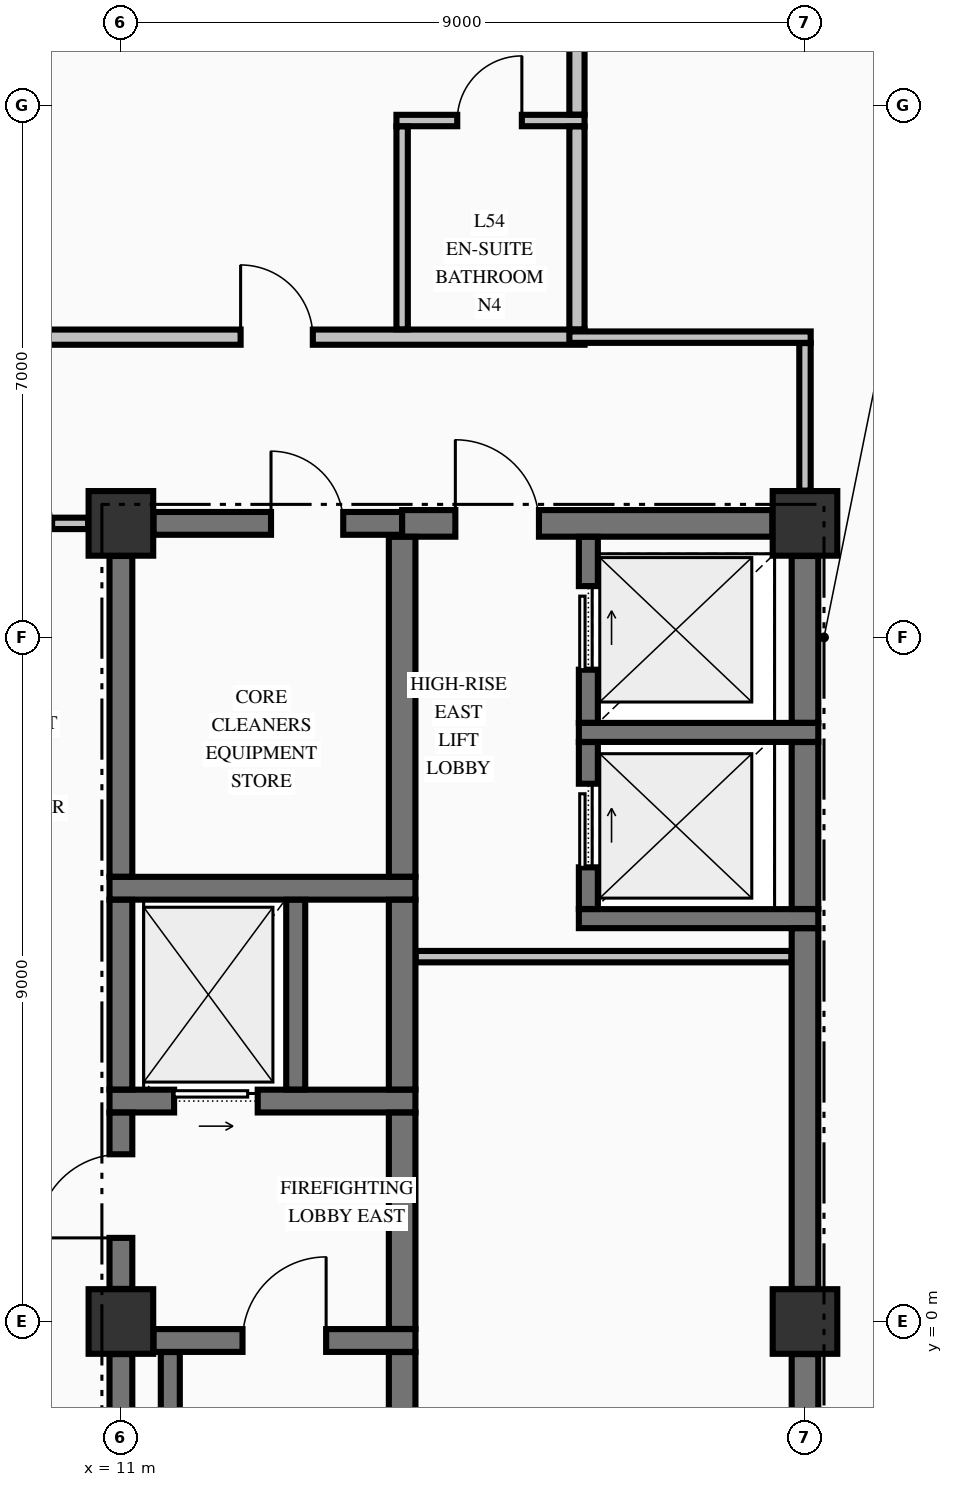
"""IFC4 building model, lengths in metres.
Left out: names, types, materials, properties, quantities, classifications, styles, units other than length and angle.
Written with IfcOpenShell. Run it as: python <this file> out.ifc"""

import sys

from ifc_helpers import new_model, si_unit, direction, frame, frame_2d, origin, origin_2d, place, context, subcontext, project, spatial, rectangle, extrude, element, fill, save


model = new_model("IFC4")
c1 = context("Model", 3, precision=1e-05, world=origin(), true_north=direction((0.0, 1.0)))
c2 = subcontext(c1, "Body", "Model", "MODEL_VIEW")
j1 = project(units=[si_unit("LENGTHUNIT", "METRE"), si_unit("PLANEANGLEUNIT", "RADIAN")], contexts=[c1])
p1 = place(None, origin())
s1 = spatial("IfcSite", under=j1, at=p1, CompositionType="ELEMENT")
p2 = place(p1, origin())
s2 = spatial("IfcBuilding", under=s1, at=p2, CompositionType="ELEMENT")
p3 = place(p2, frame((0.0, 0.0, 208.46)))
s3 = spatial("IfcBuildingStorey", under=s2, at=p3, CompositionType="ELEMENT", Elevation=208.46)
for number, where, z_axis, x_axis in (
    (1, (11.0, 0.0, -0.25), (0.0, 0.0, 1.0), (1.0, 0.0, 0.0)),
    (2, (11.0, 10.5, -0.25), (0.0, 0.0, 1.0), (1.0, 0.0, 0.0)),
    (3, (20.0, 10.5, -0.25), (0.0, 0.0, 1.0), (1.0, 0.0, 0.0)),
    (4, (20.0, 0.0, -0.25), (0.0, 0.0, 1.0), (1.0, 0.0, 0.0)),
):
    element("IfcColumn", number, at=place(p3, frame(where, z_axis=z_axis, x_axis=x_axis)), inside=s3, PredefinedType="COLUMN", context=c2, shape_type="SweptSolid", body=[
        extrude(rectangle(XDim=0.85, YDim=0.85, at=origin_2d()), origin(), (0.0, 0.0, 1.0), 3.325),
    ])
p4 = place(p3, frame((11.429, -0.25, 0.0), z_axis=(0.0, 0.0, 1.0), x_axis=(1.0, 0.0, 0.0)))
e5 = element("IfcWall", 5, at=p4, inside=s3, PredefinedType="SHEAR", context=c2, shape_type="SweptSolid", body=[
    extrude(rectangle(XDim=3.446, YDim=0.3, at=frame_2d((1.723, 0.0))), origin(), (0.0, 0.0, 1.0), 3.075),
])
p5 = place(p4, frame((1.171, 0.0, 0.0)))
e6 = element("IfcOpeningElement", 6, at=p5, cuts=e5, PredefinedType="OPENING", context=c2, shape_type="SweptSolid", body=[
    extrude(rectangle(XDim=1.1, YDim=2.15, at=frame_2d((0.55, 1.075))), frame((0.0, 0.16, 0.0), z_axis=(0.0, -1.0, 0.0), x_axis=(1.0, 0.0, 0.0)), (0.0, 0.0, 1.0), 0.32),
])
p6 = place(p3, frame((10.85, 2.9, 0.0), z_axis=(0.0, 0.0, 1.0), x_axis=(1.0, 0.0, 0.0)))
e7 = element("IfcWall", 7, at=p6, inside=s3, PredefinedType="SHEAR", context=c2, shape_type="SweptSolid", body=[
    extrude(rectangle(XDim=4.025, YDim=0.3, at=frame_2d((2.012, 0.0))), origin(), (0.0, 0.0, 1.0), 3.075),
])
p7 = place(p6, frame((0.85, 0.0, 0.0)))
e8 = element("IfcOpeningElement", 8, at=p7, cuts=e7, PredefinedType="OPENING", context=c2, shape_type="SweptSolid", body=[
    extrude(rectangle(XDim=1.1, YDim=2.2, at=frame_2d((0.55, 1.1))), frame((0.0, 0.16, 0.0), z_axis=(0.0, -1.0, 0.0), x_axis=(1.0, 0.0, 0.0)), (0.0, 0.0, 1.0), 0.32),
])
p8 = place(p3, frame((17.025, 5.3, 0.0), z_axis=(0.0, 0.0, 1.0), x_axis=(1.0, 0.0, 0.0)))
e9 = element("IfcWall", 9, at=p8, inside=s3, PredefinedType="SOLIDWALL", context=c2, shape_type="SweptSolid", body=[
    extrude(rectangle(XDim=3.15, YDim=0.25, at=frame_2d((1.575, 0.0))), origin(), (0.0, 0.0, 1.0), 3.075),
])
p9 = place(p3, frame((10.85, 5.7, 0.0), z_axis=(0.0, 0.0, 1.0), x_axis=(1.0, 0.0, 0.0)))
e10 = element("IfcWall", 10, at=p9, inside=s3, PredefinedType="SHEAR", context=c2, shape_type="SweptSolid", body=[
    extrude(rectangle(XDim=4.025, YDim=0.3, at=frame_2d((2.012, 0.0))), origin(), (0.0, 0.0, 1.0), 3.075),
])
p10 = place(p3, frame((17.025, 7.75, 0.0), z_axis=(0.0, 0.0, 1.0), x_axis=(1.0, 0.0, 0.0)))
e11 = element("IfcWall", 11, at=p10, inside=s3, PredefinedType="SOLIDWALL", context=c2, shape_type="SweptSolid", body=[
    extrude(rectangle(XDim=3.15, YDim=0.25, at=frame_2d((1.575, 0.0))), origin(), (0.0, 0.0, 1.0), 3.075),
])
p11 = place(p3, frame((11.429, 10.5, 0.0), z_axis=(0.0, 0.0, 1.0), x_axis=(1.0, 0.0, 0.0)))
e12 = element("IfcWall", 12, at=p11, inside=s3, PredefinedType="SHEAR", context=c2, shape_type="SweptSolid", body=[
    extrude(rectangle(XDim=3.271, YDim=0.3, at=frame_2d((1.635, 0.0))), origin(), (0.0, 0.0, 1.0), 3.075),
])
p12 = place(p11, frame((1.546, 0.0, 0.0)))
e13 = element("IfcOpeningElement", 13, at=p12, cuts=e12, PredefinedType="OPENING", context=c2, shape_type="SweptSolid", body=[
    extrude(rectangle(XDim=0.95, YDim=2.15, at=frame_2d((0.475, 1.075))), frame((0.0, 0.16, 0.0), z_axis=(0.0, -1.0, 0.0), x_axis=(1.0, 0.0, 0.0)), (0.0, 0.0, 1.0), 0.32),
])
p13 = place(p3, frame((14.7, 10.5, 0.0), z_axis=(0.0, 0.0, 1.0), x_axis=(1.0, 0.0, 0.0)))
e14 = element("IfcWall", 14, at=p13, inside=s3, PredefinedType="SHEAR", context=c2, shape_type="SweptSolid", body=[
    extrude(rectangle(XDim=4.871, YDim=0.35, at=frame_2d((2.436, 0.0))), origin(), (0.0, 0.0, 1.0), 3.075),
])
p14 = place(p13, frame((0.7, 0.0, 0.0)))
e15 = element("IfcOpeningElement", 15, at=p14, cuts=e14, PredefinedType="OPENING", context=c2, shape_type="SweptSolid", body=[
    extrude(rectangle(XDim=1.1, YDim=2.15, at=frame_2d((0.55, 1.075))), frame((0.0, 0.185, 0.0), z_axis=(0.0, -1.0, 0.0), x_axis=(1.0, 0.0, 0.0)), (0.0, 0.0, 1.0), 0.37),
])
p15 = place(p3, frame((14.878, 4.8, 0.0), z_axis=(0.0, 0.0, 1.0), x_axis=(1.0, 0.0, 0.0)))
e16 = element("IfcWall", 16, at=p15, inside=s3, PredefinedType="PARTITIONING", context=c2, shape_type="SweptSolid", body=[
    extrude(rectangle(XDim=4.944, YDim=0.15, at=frame_2d((2.472, 0.0))), origin(), (0.0, 0.0, 1.0), 3.075),
])
p16 = place(p3, frame((-10.569, 10.5, 0.0), z_axis=(0.0, 0.0, 1.0), x_axis=(1.0, 0.0, 0.0)))
e17 = element("IfcWall", 17, at=p16, inside=s3, PredefinedType="PARTITIONING", context=c2, shape_type="SweptSolid", body=[
    extrude(rectangle(XDim=21.138, YDim=0.15, at=frame_2d((10.569, 0.0))), origin(), (0.0, 0.0, 1.0), 3.075),
])
p17 = place(p16, frame((0.474, 0.0, 0.0)))
e18 = element("IfcOpeningElement", 18, at=p17, cuts=e17, PredefinedType="OPENING", context=c2, shape_type="SweptSolid", body=[
    extrude(rectangle(XDim=1.05, YDim=2.15, at=frame_2d((0.525, 1.075))), frame((0.0, 0.085, 0.0), z_axis=(0.0, -1.0, 0.0), x_axis=(1.0, 0.0, 0.0)), (0.0, 0.0, 1.0), 0.17),
])
p18 = place(p16, frame((19.614, 0.0, 0.0)))
e19 = element("IfcOpeningElement", 19, at=p18, cuts=e17, PredefinedType="OPENING", context=c2, shape_type="SweptSolid", body=[
    extrude(rectangle(XDim=1.05, YDim=2.15, at=frame_2d((0.525, 1.075))), frame((0.0, 0.085, 0.0), z_axis=(0.0, -1.0, 0.0), x_axis=(1.0, 0.0, 0.0)), (0.0, 0.0, 1.0), 0.17),
])
p19 = place(p3, frame((-22.1, 12.95, 0.0), z_axis=(0.0, 0.0, 1.0), x_axis=(1.0, 0.0, 0.0)))
e20 = element("IfcWall", 20, at=p19, inside=s3, PredefinedType="PARTITIONING", context=c2, shape_type="SweptSolid", body=[
    extrude(rectangle(XDim=39.2, YDim=0.2, at=frame_2d((19.6, 0.0))), origin(), (0.0, 0.0, 1.0), 3.075),
])
p20 = place(p19, frame((4.525, 0.0, 0.0)))
e21 = element("IfcOpeningElement", 21, at=p20, cuts=e20, PredefinedType="OPENING", context=c2, shape_type="SweptSolid", body=[
    extrude(rectangle(XDim=0.95, YDim=2.15, at=frame_2d((0.475, 1.075))), frame((0.0, 0.11, 0.0), z_axis=(0.0, -1.0, 0.0), x_axis=(1.0, 0.0, 0.0)), (0.0, 0.0, 1.0), 0.22),
])
p21 = place(p19, frame((12.475, 0.0, 0.0)))
e22 = element("IfcOpeningElement", 22, at=p21, cuts=e20, PredefinedType="OPENING", context=c2, shape_type="SweptSolid", body=[
    extrude(rectangle(XDim=0.95, YDim=2.15, at=frame_2d((0.475, 1.075))), frame((0.0, 0.11, 0.0), z_axis=(0.0, -1.0, 0.0), x_axis=(1.0, 0.0, 0.0)), (0.0, 0.0, 1.0), 0.22),
])
p22 = place(p19, frame((22.175, 0.0, 0.0)))
e23 = element("IfcOpeningElement", 23, at=p22, cuts=e20, PredefinedType="OPENING", context=c2, shape_type="SweptSolid", body=[
    extrude(rectangle(XDim=0.95, YDim=2.15, at=frame_2d((0.475, 1.075))), frame((0.0, 0.11, 0.0), z_axis=(0.0, -1.0, 0.0), x_axis=(1.0, 0.0, 0.0)), (0.0, 0.0, 1.0), 0.22),
])
p23 = place(p19, frame((34.675, 0.0, 0.0)))
e24 = element("IfcOpeningElement", 24, at=p23, cuts=e20, PredefinedType="OPENING", context=c2, shape_type="SweptSolid", body=[
    extrude(rectangle(XDim=0.95, YDim=2.15, at=frame_2d((0.475, 1.075))), frame((0.0, 0.11, 0.0), z_axis=(0.0, -1.0, 0.0), x_axis=(1.0, 0.0, 0.0)), (0.0, 0.0, 1.0), 0.22),
])
p24 = place(p3, frame((16.9, 12.95, 0.0), z_axis=(0.0, 0.0, 1.0), x_axis=(1.0, 0.0, 0.0)))
e25 = element("IfcWall", 25, at=p24, inside=s3, PredefinedType="PARTITIONING", context=c2, shape_type="SweptSolid", body=[
    extrude(rectangle(XDim=3.175, YDim=0.15, at=frame_2d((1.587, 0.0))), origin(), (0.0, 0.0, 1.0), 3.075),
])
p25 = place(p3, frame((14.625, 15.8, 0.0), z_axis=(0.0, 0.0, 1.0), x_axis=(1.0, 0.0, 0.0)))
e26 = element("IfcWall", 26, at=p25, inside=s3, PredefinedType="PARTITIONING", context=c2, shape_type="SweptSolid", body=[
    extrude(rectangle(XDim=2.475, YDim=0.15, at=frame_2d((1.238, 0.0))), origin(), (0.0, 0.0, 1.0), 3.075),
])
p26 = place(p25, frame((0.8, 0.0, 0.0)))
e27 = element("IfcOpeningElement", 27, at=p26, cuts=e26, PredefinedType="OPENING", context=c2, shape_type="SweptSolid", body=[
    extrude(rectangle(XDim=0.85, YDim=2.1, at=frame_2d((0.425, 1.05))), frame((0.0, 0.085, 0.0), z_axis=(0.0, -1.0, 0.0), x_axis=(1.0, 0.0, 0.0)), (0.0, 0.0, 1.0), 0.17),
])
p27 = place(p3, frame((11.0, -9.521, 0.0), z_axis=(0.0, 0.0, 1.0), x_axis=(0.0, 1.0, 0.0)))
e28 = element("IfcWall", 28, at=p27, inside=s3, PredefinedType="SHEAR", context=c2, shape_type="SweptSolid", body=[
    extrude(rectangle(XDim=9.092, YDim=0.3, at=frame_2d((4.546, 0.0))), origin(), (0.0, 0.0, 1.0), 3.075),
])
p28 = place(p3, frame((11.0, 0.429, 0.0), z_axis=(0.0, 0.0, 1.0), x_axis=(0.0, 1.0, 0.0)))
e29 = element("IfcWall", 29, at=p28, inside=s3, PredefinedType="SHEAR", context=c2, shape_type="SweptSolid", body=[
    extrude(rectangle(XDim=2.319, YDim=0.3, at=frame_2d((1.16, 0.0))), origin(), (0.0, 0.0, 1.0), 3.075),
])
p29 = place(p28, frame((0.671, 0.0, 0.0)))
e30 = element("IfcOpeningElement", 30, at=p29, cuts=e29, PredefinedType="OPENING", context=c2, shape_type="SweptSolid", body=[
    extrude(rectangle(XDim=1.1, YDim=2.15, at=frame_2d((0.55, 1.075))), frame((0.0, 0.16, 0.0), z_axis=(0.0, -1.0, 0.0), x_axis=(1.0, 0.0, 0.0)), (0.0, 0.0, 1.0), 0.32),
])
p30 = place(p3, frame((11.0, 3.052, 0.0), z_axis=(0.0, 0.0, 1.0), x_axis=(0.0, 1.0, 0.0)))
e31 = element("IfcWall", 31, at=p30, inside=s3, PredefinedType="SHEAR", context=c2, shape_type="SweptSolid", body=[
    extrude(rectangle(XDim=2.496, YDim=0.3, at=frame_2d((1.248, 0.0))), origin(), (0.0, 0.0, 1.0), 3.075),
])
p31 = place(p3, frame((11.0, 5.852, 0.0), z_axis=(0.0, 0.0, 1.0), x_axis=(0.0, 1.0, 0.0)))
e32 = element("IfcWall", 32, at=p31, inside=s3, PredefinedType="SHEAR", context=c2, shape_type="SweptSolid", body=[
    extrude(rectangle(XDim=4.219, YDim=0.3, at=frame_2d((2.109, 0.0))), origin(), (0.0, 0.0, 1.0), 3.075),
])
p32 = place(p3, frame((11.65, -9.798, 0.0), z_axis=(0.0, 0.0, 1.0), x_axis=(0.0, 1.0, 0.0)))
e33 = element("IfcWall", 33, at=p32, inside=s3, PredefinedType="SOLIDWALL", context=c2, shape_type="SweptSolid", body=[
    extrude(rectangle(XDim=9.396, YDim=0.25, at=frame_2d((4.698, 0.0))), origin(), (0.0, 0.0, 1.0), 3.075),
])
p33 = place(p3, frame((13.3, 3.052, 0.0), z_axis=(0.0, 0.0, 1.0), x_axis=(0.0, 1.0, 0.0)))
e34 = element("IfcWall", 34, at=p33, inside=s3, PredefinedType="SOLIDWALL", context=c2, shape_type="SweptSolid", body=[
    extrude(rectangle(XDim=2.496, YDim=0.25, at=frame_2d((1.248, 0.0))), origin(), (0.0, 0.0, 1.0), 3.075),
])
p34 = place(p3, frame((14.7, -9.773, 0.0), z_axis=(0.0, 0.0, 1.0), x_axis=(0.0, 1.0, 0.0)))
e35 = element("IfcWall", 35, at=p34, inside=s3, PredefinedType="SHEAR", context=c2, shape_type="SweptSolid", body=[
    extrude(rectangle(XDim=9.371, YDim=0.35, at=frame_2d((4.686, 0.0))), origin(), (0.0, 0.0, 1.0), 3.075),
])
p35 = place(p3, frame((14.7, -0.098, 0.0), z_axis=(0.0, 0.0, 1.0), x_axis=(0.0, 1.0, 0.0)))
e36 = element("IfcWall", 36, at=p35, inside=s3, PredefinedType="SHEAR", context=c2, shape_type="SweptSolid", body=[
    extrude(rectangle(XDim=2.846, YDim=0.35, at=frame_2d((1.423, 0.0))), origin(), (0.0, 0.0, 1.0), 3.075),
])
p36 = place(p3, frame((14.7, 3.052, 0.0), z_axis=(0.0, 0.0, 1.0), x_axis=(0.0, 1.0, 0.0)))
e37 = element("IfcWall", 37, at=p36, inside=s3, PredefinedType="SHEAR", context=c2, shape_type="SweptSolid", body=[
    extrude(rectangle(XDim=2.496, YDim=0.35, at=frame_2d((1.248, 0.0))), origin(), (0.0, 0.0, 1.0), 3.075),
])
p37 = place(p3, frame((14.7, 5.852, 0.0), z_axis=(0.0, 0.0, 1.0), x_axis=(0.0, 1.0, 0.0)))
e38 = element("IfcWall", 38, at=p37, inside=s3, PredefinedType="SHEAR", context=c2, shape_type="SweptSolid", body=[
    extrude(rectangle(XDim=4.471, YDim=0.35, at=frame_2d((2.235, 0.0))), origin(), (0.0, 0.0, 1.0), 3.075),
])
p38 = place(p3, frame((17.15, 5.427, 0.0), z_axis=(0.0, 0.0, 1.0), x_axis=(0.0, 1.0, 0.0)))
e39 = element("IfcWall", 39, at=p38, inside=s3, PredefinedType="SOLIDWALL", context=c2, shape_type="SweptSolid", body=[
    extrude(rectangle(XDim=2.196, YDim=0.25, at=frame_2d((1.098, 0.0))), origin(), (0.0, 0.0, 1.0), 3.075),
])
p39 = place(p38, frame((0.548, 0.0, 0.0)))
e40 = element("IfcOpeningElement", 40, at=p39, cuts=e39, PredefinedType="OPENING", context=c2, shape_type="SweptSolid", body=[
    extrude(rectangle(XDim=1.1, YDim=2.2, at=frame_2d((0.55, 1.1))), frame((0.0, 0.135, 0.0), z_axis=(0.0, -1.0, 0.0), x_axis=(1.0, 0.0, 0.0)), (0.0, 0.0, 1.0), 0.27),
])
p40 = place(p3, frame((17.15, 7.877, 0.0), z_axis=(0.0, 0.0, 1.0), x_axis=(0.0, 1.0, 0.0)))
e41 = element("IfcWall", 41, at=p40, inside=s3, PredefinedType="SOLIDWALL", context=c2, shape_type="SweptSolid", body=[
    extrude(rectangle(XDim=2.446, YDim=0.25, at=frame_2d((1.223, 0.0))), origin(), (0.0, 0.0, 1.0), 3.075),
])
p41 = place(p40, frame((0.698, 0.0, 0.0)))
e42 = element("IfcOpeningElement", 42, at=p41, cuts=e41, PredefinedType="OPENING", context=c2, shape_type="SweptSolid", body=[
    extrude(rectangle(XDim=1.1, YDim=2.2, at=frame_2d((0.55, 1.1))), frame((0.0, 0.135, 0.0), z_axis=(0.0, -1.0, 0.0), x_axis=(1.0, 0.0, 0.0)), (0.0, 0.0, 1.0), 0.27),
])
p42 = place(p3, frame((20.0, -9.521, 0.0), z_axis=(0.0, 0.0, 1.0), x_axis=(0.0, 1.0, 0.0)))
e43 = element("IfcWall", 43, at=p42, inside=s3, PredefinedType="SHEAR", context=c2, shape_type="SweptSolid", body=[
    extrude(rectangle(XDim=9.092, YDim=0.35, at=frame_2d((4.546, 0.0))), origin(), (0.0, 0.0, 1.0), 3.075),
])
p43 = place(p3, frame((20.0, 0.429, 0.0), z_axis=(0.0, 0.0, 1.0), x_axis=(0.0, 1.0, 0.0)))
e44 = element("IfcWall", 44, at=p43, inside=s3, PredefinedType="SHEAR", context=c2, shape_type="SweptSolid", body=[
    extrude(rectangle(XDim=4.744, YDim=0.35, at=frame_2d((2.372, 0.0))), origin(), (0.0, 0.0, 1.0), 3.075),
])
p44 = place(p3, frame((20.0, 5.427, 0.0), z_axis=(0.0, 0.0, 1.0), x_axis=(0.0, 1.0, 0.0)))
e45 = element("IfcWall", 45, at=p44, inside=s3, PredefinedType="SHEAR", context=c2, shape_type="SweptSolid", body=[
    extrude(rectangle(XDim=2.196, YDim=0.35, at=frame_2d((1.098, 0.0))), origin(), (0.0, 0.0, 1.0), 3.075),
])
p45 = place(p3, frame((20.0, 7.877, 0.0), z_axis=(0.0, 0.0, 1.0), x_axis=(0.0, 1.0, 0.0)))
e46 = element("IfcWall", 46, at=p45, inside=s3, PredefinedType="SHEAR", context=c2, shape_type="SweptSolid", body=[
    extrude(rectangle(XDim=2.194, YDim=0.35, at=frame_2d((1.097, 0.0))), origin(), (0.0, 0.0, 1.0), 3.075),
])
p46 = place(p3, frame((14.7, 13.053, 0.0), z_axis=(0.0, 0.0, 1.0), x_axis=(0.0, 1.0, 0.0)))
e47 = element("IfcWall", 47, at=p46, inside=s3, PredefinedType="PARTITIONING", context=c2, shape_type="SweptSolid", body=[
    extrude(rectangle(XDim=2.669, YDim=0.15, at=frame_2d((1.334, 0.0))), origin(), (0.0, 0.0, 1.0), 3.075),
])
p47 = place(p3, frame((17.0, 13.053, 0.0), z_axis=(0.0, 0.0, 1.0), x_axis=(0.0, 1.0, 0.0)))
e48 = element("IfcWall", 48, at=p47, inside=s3, PredefinedType="PARTITIONING", context=c2, shape_type="SweptSolid", body=[
    extrude(rectangle(XDim=2.669, YDim=0.2, at=frame_2d((1.334, 0.0))), origin(), (0.0, 0.0, 1.0), 3.075),
])
p48 = place(p3, frame((17.0, 15.878, 0.0), z_axis=(0.0, 0.0, 1.0), x_axis=(0.0, 1.0, 0.0)))
e49 = element("IfcWall", 49, at=p48, inside=s3, PredefinedType="PARTITIONING", context=c2, shape_type="SweptSolid", body=[
    extrude(rectangle(XDim=3.116, YDim=0.2, at=frame_2d((1.558, 0.0))), origin(), (0.0, 0.0, 1.0), 3.075),
])
p49 = place(p3, frame((20.0, 10.931, 0.0), z_axis=(0.0, 0.0, 1.0), x_axis=(0.0, 1.0, 0.0)))
e50 = element("IfcWall", 50, at=p49, inside=s3, PredefinedType="PARTITIONING", context=c2, shape_type="SweptSolid", body=[
    extrude(rectangle(XDim=1.941, YDim=0.15, at=frame_2d((0.971, 0.0))), origin(), (0.0, 0.0, 1.0), 2.267),
])
p50 = place(p5, origin())
e51 = element("IfcDoor", 51, at=p50, inside=s3, OperationType="SINGLE_SWING_RIGHT", PredefinedType="DOOR", context=c2, shape_type="SweptSolid", body=[
    extrude(rectangle(XDim=1.1, YDim=2.15, at=frame_2d((0.55, 1.075))), frame((0.0, 0.025, 0.0), z_axis=(0.0, -1.0, 0.0), x_axis=(1.0, 0.0, 0.0)), (0.0, 0.0, 1.0), 0.05),
])
fill(e6, e51)
p51 = place(p29, origin())
e52 = element("IfcDoor", 52, at=p51, inside=s3, OperationType="SINGLE_SWING_LEFT", PredefinedType="DOOR", context=c2, shape_type="SweptSolid", body=[
    extrude(rectangle(XDim=1.1, YDim=2.15, at=frame_2d((0.55, 1.075))), frame((0.0, 0.025, 0.0), z_axis=(0.0, -1.0, 0.0), x_axis=(1.0, 0.0, 0.0)), (0.0, 0.0, 1.0), 0.05),
])
fill(e30, e52)
p52 = place(p7, origin())
e53 = element("IfcDoor", 53, at=p52, inside=s3, OperationType="SLIDING_TO_RIGHT", PredefinedType="DOOR", context=c2, shape_type="SweptSolid", body=[
    extrude(rectangle(XDim=1.1, YDim=2.2, at=frame_2d((0.55, 1.1))), frame((0.0, 0.025, 0.0), z_axis=(0.0, -1.0, 0.0), x_axis=(1.0, 0.0, 0.0)), (0.0, 0.0, 1.0), 0.05),
])
fill(e8, e53)
p53 = place(p12, origin())
e54 = element("IfcDoor", 54, at=p53, inside=s3, OperationType="SINGLE_SWING_LEFT", PredefinedType="DOOR", context=c2, shape_type="SweptSolid", body=[
    extrude(rectangle(XDim=0.95, YDim=2.15, at=frame_2d((0.475, 1.075))), frame((0.0, 0.025, 0.0), z_axis=(0.0, -1.0, 0.0), x_axis=(1.0, 0.0, 0.0)), (0.0, 0.0, 1.0), 0.05),
])
fill(e13, e54)
p54 = place(p39, origin())
e55 = element("IfcDoor", 55, at=p54, inside=s3, OperationType="SLIDING_TO_RIGHT", PredefinedType="DOOR", context=c2, shape_type="SweptSolid", body=[
    extrude(rectangle(XDim=1.1, YDim=2.2, at=frame_2d((0.55, 1.1))), frame((0.0, 0.025, 0.0), z_axis=(0.0, -1.0, 0.0), x_axis=(1.0, 0.0, 0.0)), (0.0, 0.0, 1.0), 0.05),
])
fill(e40, e55)
p55 = place(p41, origin())
e56 = element("IfcDoor", 56, at=p55, inside=s3, OperationType="SLIDING_TO_RIGHT", PredefinedType="DOOR", context=c2, shape_type="SweptSolid", body=[
    extrude(rectangle(XDim=1.1, YDim=2.2, at=frame_2d((0.55, 1.1))), frame((0.0, 0.025, 0.0), z_axis=(0.0, -1.0, 0.0), x_axis=(1.0, 0.0, 0.0)), (0.0, 0.0, 1.0), 0.05),
])
fill(e42, e56)
p56 = place(p14, origin())
e57 = element("IfcDoor", 57, at=p56, inside=s3, OperationType="SINGLE_SWING_LEFT", PredefinedType="DOOR", context=c2, shape_type="SweptSolid", body=[
    extrude(rectangle(XDim=1.1, YDim=2.15, at=frame_2d((0.55, 1.075))), frame((0.0, 0.025, 0.0), z_axis=(0.0, -1.0, 0.0), x_axis=(1.0, 0.0, 0.0)), (0.0, 0.0, 1.0), 0.05),
])
fill(e15, e57)
p57 = place(p23, origin())
e58 = element("IfcDoor", 58, at=p57, inside=s3, OperationType="SINGLE_SWING_LEFT", PredefinedType="DOOR", context=c2, shape_type="SweptSolid", body=[
    extrude(rectangle(XDim=0.95, YDim=2.15, at=frame_2d((0.475, 1.075))), frame((0.0, 0.025, 0.0), z_axis=(0.0, -1.0, 0.0), x_axis=(1.0, 0.0, 0.0)), (0.0, 0.0, 1.0), 0.05),
])
fill(e24, e58)
p58 = place(p26, origin())
e59 = element("IfcDoor", 59, at=p58, inside=s3, OperationType="SINGLE_SWING_RIGHT", PredefinedType="DOOR", context=c2, shape_type="SweptSolid", body=[
    extrude(rectangle(XDim=0.85, YDim=2.1, at=frame_2d((0.425, 1.05))), frame((0.0, 0.025, 0.0), z_axis=(0.0, -1.0, 0.0), x_axis=(1.0, 0.0, 0.0)), (0.0, 0.0, 1.0), 0.05),
])
fill(e27, e59)
save(model, sys.argv[1])
